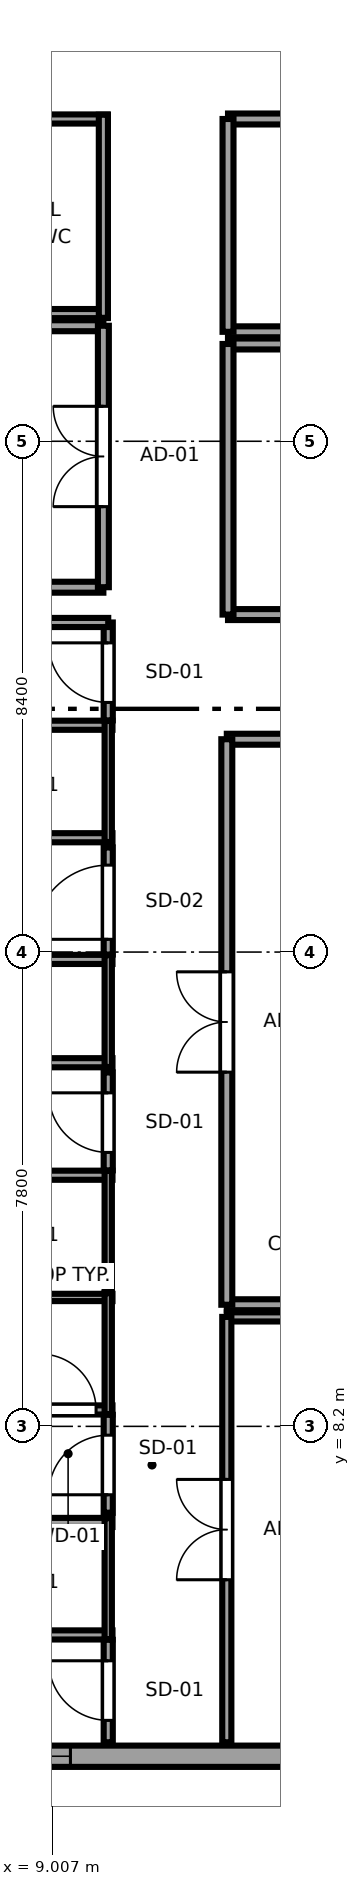
"""IFC4 building model, lengths in metres.
Left out: names, types, materials, properties, quantities, classifications, styles, units other than length and angle.
Written with IfcOpenShell. Run it as: python <this file> out.ifc"""

import sys

from ifc_helpers import new_model, si_unit, direction, frame, frame_2d, origin, place, context, subcontext, project, spatial, rectangle, extrude, source, transform, mapped, element, fill, save


model = new_model("IFC4")
c1 = context("Model", 3, precision=1e-05, world=origin(), true_north=direction((0.0, 1.0)))
c2 = subcontext(c1, "Body", "Model", "MODEL_VIEW")
j1 = project(units=[si_unit("LENGTHUNIT", "METRE"), si_unit("PLANEANGLEUNIT", "RADIAN")], contexts=[c1])
p1 = place(None, origin())
s1 = spatial("IfcSite", under=j1, at=p1, CompositionType="ELEMENT")
p2 = place(p1, origin())
s2 = spatial("IfcBuilding", under=s1, at=p2, CompositionType="ELEMENT")
p3 = place(p2, frame((0.0, 0.0, 262.95)))
s3 = spatial("IfcBuildingStorey", under=s2, at=p3, CompositionType="ELEMENT", Elevation=262.95)
p4 = place(p3, frame((7.017, 2.775, 0.0), z_axis=(0.0, 0.0, 1.0), x_axis=(1.0, 0.0, 0.0)))
e1 = element("IfcWall", 1, at=p4, inside=s3, PredefinedType="SOLIDWALL", context=c2, shape_type="SweptSolid", body=[
    extrude(rectangle(XDim=8.008, YDim=0.35, at=frame_2d((4.004, 0.0))), origin(), (0.0, 0.0, 1.0), 3.37),
])
p5 = place(p4, frame((0.791, 0.0, 0.62)))
e2 = element("IfcOpeningElement", 2, at=p5, cuts=e1, PredefinedType="OPENING", context=c2, shape_type="SweptSolid", body=[
    extrude(rectangle(XDim=1.5, YDim=1.55, at=frame_2d((0.75, 0.775))), frame((0.0, 0.185, 0.0), z_axis=(0.0, -1.0, 0.0), x_axis=(1.0, 0.0, 0.0)), (0.0, 0.0, 1.0), 0.37),
])
p6 = place(p3, frame((7.41, 4.77, 0.0), z_axis=(0.0, 0.0, 1.0), x_axis=(1.0, 0.0, 0.0)))
e3 = element("IfcWall", 3, at=p6, inside=s3, PredefinedType="PARTITIONING", context=c2, shape_type="SweptSolid", body=[
    extrude(rectangle(XDim=2.59, YDim=0.15, at=frame_2d((1.295, 0.0))), origin(), (0.0, 0.0, 1.0), 2.9),
])
p7 = place(p3, frame((7.41, 6.62, 0.0), z_axis=(0.0, 0.0, 1.0), x_axis=(1.0, 0.0, 0.0)))
e4 = element("IfcWall", 4, at=p7, inside=s3, PredefinedType="PARTITIONING", context=c2, shape_type="SweptSolid", body=[
    extrude(rectangle(XDim=2.59, YDim=0.15, at=frame_2d((1.295, 0.0))), origin(), (0.0, 0.0, 1.0), 3.37),
])
p8 = place(p3, frame((9.93, 4.7, 0.0), z_axis=(0.0, 0.0, 1.0), x_axis=(0.0, 1.0, 0.0)))
e5 = element("IfcWall", 5, at=p8, inside=s3, PredefinedType="PLUMBINGWALL", context=c2, shape_type="SweptSolid", body=[
    extrude(rectangle(XDim=1.99, YDim=0.12, at=frame_2d((0.995, 0.0))), origin(), (0.0, 0.0, 1.0), 3.37),
])
p9 = place(p3, frame((7.41, 8.47, 0.0), z_axis=(0.0, 0.0, 1.0), x_axis=(1.0, 0.0, 0.0)))
e6 = element("IfcWall", 6, at=p9, inside=s3, PredefinedType="PARTITIONING", context=c2, shape_type="SweptSolid", body=[
    extrude(rectangle(XDim=2.59, YDim=0.15, at=frame_2d((1.295, 0.0))), origin(), (0.0, 0.0, 1.0), 3.37),
])
p10 = place(p9, frame((1.4, 0.0, 0.0)))
e7 = element("IfcOpeningElement", 7, at=p10, cuts=e6, PredefinedType="OPENING", context=c2, shape_type="SweptSolid", body=[
    extrude(rectangle(XDim=0.92, YDim=2.01, at=frame_2d((0.46, 1.005))), frame((0.0, 0.085, 0.0), z_axis=(0.0, -1.0, 0.0), x_axis=(1.0, 0.0, 0.0)), (0.0, 0.0, 1.0), 0.17),
])
p11 = place(p3, frame((7.41, 10.32, 0.0), z_axis=(0.0, 0.0, 1.0), x_axis=(1.0, 0.0, 0.0)))
e8 = element("IfcWall", 8, at=p11, inside=s3, PredefinedType="PLUMBINGWALL", context=c2, shape_type="SweptSolid", body=[
    extrude(rectangle(XDim=2.59, YDim=0.12, at=frame_2d((1.295, 0.0))), origin(), (0.0, 0.0, 1.0), 3.37),
])
p12 = place(p3, frame((9.93, 8.4, 0.0), z_axis=(0.0, 0.0, 1.0), x_axis=(0.0, 1.0, 0.0)))
e9 = element("IfcWall", 9, at=p12, inside=s3, PredefinedType="PLUMBINGWALL", context=c2, shape_type="SweptSolid", body=[
    extrude(rectangle(XDim=1.99, YDim=0.12, at=frame_2d((0.995, 0.0))), origin(), (0.0, 0.0, 1.0), 3.37),
])
p13 = place(p3, frame((7.41, 12.33, 0.0), z_axis=(0.0, 0.0, 1.0), x_axis=(1.0, 0.0, 0.0)))
e10 = element("IfcWall", 10, at=p13, inside=s3, PredefinedType="PARTITIONING", context=c2, shape_type="SweptSolid", body=[
    extrude(rectangle(XDim=2.59, YDim=0.15, at=frame_2d((1.295, 0.0))), origin(), (0.0, 0.0, 1.0), 3.37),
])
p14 = place(p3, frame((9.93, 10.41, 0.0), z_axis=(0.0, 0.0, 1.0), x_axis=(0.0, 1.0, 0.0)))
e11 = element("IfcWall", 11, at=p14, inside=s3, PredefinedType="PLUMBINGWALL", context=c2, shape_type="SweptSolid", body=[
    extrude(rectangle(XDim=1.99, YDim=0.12, at=frame_2d((0.995, 0.0))), origin(), (0.0, 0.0, 1.0), 3.37),
])
p15 = place(p3, frame((3.005, 14.18, 0.0), z_axis=(0.0, 0.0, 1.0), x_axis=(1.0, 0.0, 0.0)))
e12 = element("IfcWall", 12, at=p15, inside=s3, PredefinedType="PARTITIONING", context=c2, shape_type="SweptSolid", body=[
    extrude(rectangle(XDim=6.995, YDim=0.15, at=frame_2d((3.498, 0.0))), origin(), (0.0, 0.0, 1.0), 3.37),
])
p16 = place(p3, frame((6.486, 15.879, 0.0), z_axis=(0.0, 0.0, 1.0), x_axis=(1.0, 0.0, 0.0)))
e13 = element("IfcWall", 13, at=p16, inside=s3, PredefinedType="PARTITIONING", context=c2, shape_type="SweptSolid", body=[
    extrude(rectangle(XDim=3.514, YDim=0.15, at=frame_2d((1.757, 0.0))), origin(), (0.0, 0.0, 1.0), 2.827),
])
p17 = place(p3, frame((9.93, 14.11, 0.0), z_axis=(0.0, 0.0, 1.0), x_axis=(0.0, 1.0, 0.0)))
e14 = element("IfcWall", 14, at=p17, inside=s3, PredefinedType="PLUMBINGWALL", context=c2, shape_type="SweptSolid", body=[
    extrude(rectangle(XDim=1.839, YDim=0.12, at=frame_2d((0.919, 0.0))), origin(), (0.0, 0.0, 1.0), 3.37),
])
p18 = place(p3, frame((3.005, 17.88, 0.0), z_axis=(0.0, 0.0, 1.0), x_axis=(1.0, 0.0, 0.0)))
e15 = element("IfcWall", 15, at=p18, inside=s3, PredefinedType="PARTITIONING", context=c2, shape_type="SweptSolid", body=[
    extrude(rectangle(XDim=6.995, YDim=0.15, at=frame_2d((3.498, 0.0))), origin(), (0.0, 0.0, 1.0), 3.37),
])
p19 = place(p3, frame((7.41, 19.73, 0.0), z_axis=(0.0, 0.0, 1.0), x_axis=(1.0, 0.0, 0.0)))
e16 = element("IfcWall", 16, at=p19, inside=s3, PredefinedType="PARTITIONING", context=c2, shape_type="SweptSolid", body=[
    extrude(rectangle(XDim=2.59, YDim=0.15, at=frame_2d((1.295, 0.0))), origin(), (0.0, 0.0, 1.0), 3.37),
])
p20 = place(p3, frame((9.93, 17.81, 0.0), z_axis=(0.0, 0.0, 1.0), x_axis=(0.0, 1.0, 0.0)))
e17 = element("IfcWall", 17, at=p20, inside=s3, PredefinedType="PLUMBINGWALL", context=c2, shape_type="SweptSolid", body=[
    extrude(rectangle(XDim=1.99, YDim=0.12, at=frame_2d((0.995, 0.0))), origin(), (0.0, 0.0, 1.0), 3.37),
])
p21 = place(p3, frame((9.93, 3.005, 0.0), z_axis=(0.0, 0.0, 1.0), x_axis=(0.0, 1.0, 0.0)))
e18 = element("IfcWall", 18, at=p21, inside=s3, PredefinedType="PARTITIONING", context=c2, shape_type="SweptSolid", body=[
    extrude(rectangle(XDim=1.685, YDim=0.15, at=frame_2d((0.843, 0.0))), origin(), (0.0, 0.0, 1.0), 3.37),
])
p22 = place(p21, frame((0.36, 0.0, 0.0)))
e19 = element("IfcOpeningElement", 19, at=p22, cuts=e18, PredefinedType="OPENING", context=c2, shape_type="SweptSolid", body=[
    extrude(rectangle(XDim=0.98, YDim=2.12, at=frame_2d((0.49, 1.06))), frame((0.0, 0.085, 0.0), z_axis=(0.0, -1.0, 0.0), x_axis=(1.0, 0.0, 0.0)), (0.0, 0.0, 1.0), 0.17),
])
p23 = place(p3, frame((9.93, 6.78, 0.0), z_axis=(0.0, 0.0, 1.0), x_axis=(0.0, 1.0, 0.0)))
e20 = element("IfcWall", 20, at=p23, inside=s3, PredefinedType="PARTITIONING", context=c2, shape_type="SweptSolid", body=[
    extrude(rectangle(XDim=1.61, YDim=0.15, at=frame_2d((0.805, 0.0))), origin(), (0.0, 0.0, 1.0), 3.37),
])
p24 = place(p23, frame((0.295, 0.0, 0.0)))
e21 = element("IfcOpeningElement", 21, at=p24, cuts=e20, PredefinedType="OPENING", context=c2, shape_type="SweptSolid", body=[
    extrude(rectangle(XDim=0.98, YDim=2.12, at=frame_2d((0.49, 1.06))), frame((0.0, 0.085, 0.0), z_axis=(0.0, -1.0, 0.0), x_axis=(1.0, 0.0, 0.0)), (0.0, 0.0, 1.0), 0.17),
])
p25 = place(p3, frame((9.93, 12.41, 0.0), z_axis=(0.0, 0.0, 1.0), x_axis=(0.0, 1.0, 0.0)))
e22 = element("IfcWall", 22, at=p25, inside=s3, PredefinedType="PARTITIONING", context=c2, shape_type="SweptSolid", body=[
    extrude(rectangle(XDim=1.61, YDim=0.15, at=frame_2d((0.805, 0.0))), origin(), (0.0, 0.0, 1.0), 3.37),
])
p26 = place(p25, frame((0.295, 0.0, 0.0)))
e23 = element("IfcOpeningElement", 23, at=p26, cuts=e22, PredefinedType="OPENING", context=c2, shape_type="SweptSolid", body=[
    extrude(rectangle(XDim=0.98, YDim=2.12, at=frame_2d((0.49, 1.06))), frame((0.0, 0.085, 0.0), z_axis=(0.0, -1.0, 0.0), x_axis=(1.0, 0.0, 0.0)), (0.0, 0.0, 1.0), 0.17),
])
p27 = place(p3, frame((9.93, 15.959, 0.0), z_axis=(0.0, 0.0, 1.0), x_axis=(0.0, 1.0, 0.0)))
e24 = element("IfcWall", 24, at=p27, inside=s3, PredefinedType="PARTITIONING", context=c2, shape_type="SweptSolid", body=[
    extrude(rectangle(XDim=1.761, YDim=0.15, at=frame_2d((0.88, 0.0))), origin(), (0.0, 0.0, 1.0), 3.37),
])
p28 = place(p27, frame((0.25, 0.0, 0.0)))
e25 = element("IfcOpeningElement", 25, at=p28, cuts=e24, PredefinedType="OPENING", context=c2, shape_type="SweptSolid", body=[
    extrude(rectangle(XDim=1.22, YDim=2.08, at=frame_2d((0.61, 1.04))), frame((0.0, 0.085, 0.0), z_axis=(0.0, -1.0, 0.0), x_axis=(1.0, 0.0, 0.0)), (0.0, 0.0, 1.0), 0.17),
])
p29 = place(p3, frame((9.93, 19.81, 0.0), z_axis=(0.0, 0.0, 1.0), x_axis=(0.0, 1.0, 0.0)))
e26 = element("IfcWall", 26, at=p29, inside=s3, PredefinedType="PARTITIONING", context=c2, shape_type="SweptSolid", body=[
    extrude(rectangle(XDim=1.61, YDim=0.15, at=frame_2d((0.805, 0.0))), origin(), (0.0, 0.0, 1.0), 3.37),
])
p30 = place(p29, frame((0.295, 0.0, 0.0)))
e27 = element("IfcOpeningElement", 27, at=p30, cuts=e26, PredefinedType="OPENING", context=c2, shape_type="SweptSolid", body=[
    extrude(rectangle(XDim=0.98, YDim=2.12, at=frame_2d((0.49, 1.06))), frame((0.0, 0.085, 0.0), z_axis=(0.0, -1.0, 0.0), x_axis=(1.0, 0.0, 0.0)), (0.0, 0.0, 1.0), 0.17),
])
p31 = place(p3, frame((3.005, 21.42, 0.0), z_axis=(0.0, 0.0, 1.0), x_axis=(1.0, 0.0, 0.0)))
e28 = element("IfcWall", 28, at=p31, inside=s3, PredefinedType="PARTITIONING", context=c2, shape_type="SweptSolid", body=[
    extrude(rectangle(XDim=6.925, YDim=0.15, at=frame_2d((3.462, 0.0))), origin(), (0.0, 0.0, 1.0), 3.37),
])
for number, where, z_axis, x_axis in (
    (29, (11.88, 10.2, 0.0), (0.0, 0.0, 1.0), (1.0, 0.0, 0.0)),
    (30, (11.88, 19.5, 0.0), (0.0, 0.0, 1.0), (1.0, 0.0, 0.0)),
):
    element("IfcWall", number, at=place(p3, frame(where, z_axis=z_axis, x_axis=x_axis)), inside=s3, PredefinedType="PARTITIONING", context=c2, shape_type="SweptSolid", body=[
        extrude(rectangle(XDim=2.97, YDim=0.18, at=frame_2d((1.485, 0.0))), origin(), (0.0, 0.0, 1.0), 3.37),
    ])
p32 = place(p3, frame((11.88, 10.2, 0.0), z_axis=(0.0, 0.0, 1.0), x_axis=(0.0, 1.0, 0.0)))
e31 = element("IfcWall", 31, at=p32, inside=s3, PredefinedType="PARTITIONING", context=c2, shape_type="SweptSolid", body=[
    extrude(rectangle(XDim=9.3, YDim=0.18, at=frame_2d((4.65, 0.0))), origin(), (0.0, 0.0, 1.0), 3.37),
])
p33 = place(p32, frame((3.825, 0.0, 0.0)))
e32 = element("IfcOpeningElement", 32, at=p33, cuts=e31, PredefinedType="OPENING", context=c2, shape_type="SweptSolid", body=[
    extrude(rectangle(XDim=1.65, YDim=2.15, at=frame_2d((0.825, 1.075))), frame((0.0, 0.1, 0.0), z_axis=(0.0, -1.0, 0.0), x_axis=(1.0, 0.0, 0.0)), (0.0, 0.0, 1.0), 0.2),
])
p34 = place(p3, frame((11.88, 10.0, 0.0), z_axis=(0.0, 0.0, 1.0), x_axis=(1.0, 0.0, 0.0)))
e33 = element("IfcWall", 33, at=p34, inside=s3, PredefinedType="PARTITIONING", context=c2, shape_type="SweptSolid", body=[
    extrude(rectangle(XDim=2.97, YDim=0.15, at=frame_2d((1.485, 0.0))), origin(), (0.0, 0.0, 1.0), 3.37),
])
p35 = place(p3, frame((11.88, 3.005, 0.0), z_axis=(0.0, 0.0, 1.0), x_axis=(0.0, 1.0, 0.0)))
e34 = element("IfcWall", 34, at=p35, inside=s3, PredefinedType="PARTITIONING", context=c2, shape_type="SweptSolid", body=[
    extrude(rectangle(XDim=6.995, YDim=0.15, at=frame_2d((3.498, 0.0))), origin(), (0.0, 0.0, 1.0), 3.37),
])
p36 = place(p35, frame((2.673, 0.0, 0.0)))
e35 = element("IfcOpeningElement", 35, at=p36, cuts=e34, PredefinedType="OPENING", context=c2, shape_type="SweptSolid", body=[
    extrude(rectangle(XDim=1.65, YDim=2.15, at=frame_2d((0.825, 1.075))), frame((0.0, 0.085, 0.0), z_axis=(0.0, -1.0, 0.0), x_axis=(1.0, 0.0, 0.0)), (0.0, 0.0, 1.0), 0.17),
])
p37 = place(p3, frame((11.9, 21.55, 0.0), z_axis=(0.0, 0.0, 1.0), x_axis=(1.0, 0.0, 0.0)))
e36 = element("IfcWall", 36, at=p37, inside=s3, PredefinedType="PARTITIONING", context=c2, shape_type="SweptSolid", body=[
    extrude(rectangle(XDim=20.9, YDim=0.18, at=frame_2d((10.45, 0.0))), origin(), (0.0, 0.0, 1.0), 3.37),
])
p38 = place(p37, frame((10.575, 0.0, 0.0)))
e37 = element("IfcOpeningElement", 37, at=p38, cuts=e36, PredefinedType="OPENING", context=c2, shape_type="SweptSolid", body=[
    extrude(rectangle(XDim=1.65, YDim=2.15, at=frame_2d((0.825, 1.075))), frame((0.0, 0.1, 0.0), z_axis=(0.0, -1.0, 0.0), x_axis=(1.0, 0.0, 0.0)), (0.0, 0.0, 1.0), 0.2),
])
p39 = place(p3, frame((11.9, 26.0, 0.0), z_axis=(0.0, 0.0, 1.0), x_axis=(1.0, 0.0, 0.0)))
e38 = element("IfcWall", 38, at=p39, inside=s3, PredefinedType="PARTITIONING", context=c2, shape_type="SweptSolid", body=[
    extrude(rectangle(XDim=20.9, YDim=0.18, at=frame_2d((10.45, 0.0))), origin(), (0.0, 0.0, 1.0), 3.37),
])
p40 = place(p3, frame((11.9, 21.55, 0.0), z_axis=(0.0, 0.0, 1.0), x_axis=(0.0, 1.0, 0.0)))
e39 = element("IfcWall", 39, at=p40, inside=s3, PredefinedType="PARTITIONING", context=c2, shape_type="SweptSolid", body=[
    extrude(rectangle(XDim=4.45, YDim=0.18, at=frame_2d((2.225, 0.0))), origin(), (0.0, 0.0, 1.0), 3.37),
])
p41 = place(p3, frame((11.9, 26.2, 0.0), z_axis=(0.0, 0.0, 1.0), x_axis=(1.0, 0.0, 0.0)))
e40 = element("IfcWall", 40, at=p41, inside=s3, PredefinedType="PARTITIONING", context=c2, shape_type="SweptSolid", body=[
    extrude(rectangle(XDim=20.9, YDim=0.18, at=frame_2d((10.45, 0.0))), origin(), (0.0, 0.0, 1.0), 3.37),
])
p42 = place(p3, frame((11.9, 29.7, 0.0), z_axis=(0.0, 0.0, 1.0), x_axis=(1.0, 0.0, 0.0)))
e41 = element("IfcWall", 41, at=p42, inside=s3, PredefinedType="PARTITIONING", context=c2, shape_type="SweptSolid", body=[
    extrude(rectangle(XDim=20.9, YDim=0.18, at=frame_2d((10.45, 0.0))), origin(), (0.0, 0.0, 1.0), 3.37),
])
p43 = place(p42, frame((9.625, 0.0, 0.0)))
e42 = element("IfcOpeningElement", 42, at=p43, cuts=e41, PredefinedType="OPENING", context=c2, shape_type="SweptSolid", body=[
    extrude(rectangle(XDim=1.65, YDim=2.15, at=frame_2d((0.825, 1.075))), frame((0.0, 0.1, 0.0), z_axis=(0.0, -1.0, 0.0), x_axis=(1.0, 0.0, 0.0)), (0.0, 0.0, 1.0), 0.2),
])
p44 = place(p3, frame((11.9, 26.2, 0.0), z_axis=(0.0, 0.0, 1.0), x_axis=(0.0, 1.0, 0.0)))
e43 = element("IfcWall", 43, at=p44, inside=s3, PredefinedType="PARTITIONING", context=c2, shape_type="SweptSolid", body=[
    extrude(rectangle(XDim=3.5, YDim=0.18, at=frame_2d((1.75, 0.0))), origin(), (0.0, 0.0, 1.0), 3.37),
])
for number, where, z_axis, x_axis in (
    (44, (3.005, 22.0, 0.0), (0.0, 0.0, 1.0), (1.0, 0.0, 0.0)),
    (45, (3.005, 26.3, 0.0), (0.0, 0.0, 1.0), (1.0, 0.0, 0.0)),
):
    element("IfcWall", number, at=place(p3, frame(where, z_axis=z_axis, x_axis=x_axis)), inside=s3, PredefinedType="PARTITIONING", context=c2, shape_type="SweptSolid", body=[
        extrude(rectangle(XDim=6.845, YDim=0.18, at=frame_2d((3.423, 0.0))), origin(), (0.0, 0.0, 1.0), 3.37),
    ])
p45 = place(p3, frame((9.85, 22.0, 0.0), z_axis=(0.0, 0.0, 1.0), x_axis=(0.0, 1.0, 0.0)))
e46 = element("IfcWall", 46, at=p45, inside=s3, PredefinedType="PARTITIONING", context=c2, shape_type="SweptSolid", body=[
    extrude(rectangle(XDim=4.3, YDim=0.18, at=frame_2d((2.15, 0.0))), origin(), (0.0, 0.0, 1.0), 3.37),
])
p46 = place(p45, frame((1.325, 0.0, 0.0)))
e47 = element("IfcOpeningElement", 47, at=p46, cuts=e46, PredefinedType="OPENING", context=c2, shape_type="SweptSolid", body=[
    extrude(rectangle(XDim=1.65, YDim=2.15, at=frame_2d((0.825, 1.075))), frame((0.0, 0.1, 0.0), z_axis=(0.0, -1.0, 0.0), x_axis=(1.0, 0.0, 0.0)), (0.0, 0.0, 1.0), 0.2),
])
p47 = place(p3, frame((6.13, 26.5, 0.0), z_axis=(0.0, 0.0, 1.0), x_axis=(1.0, 0.0, 0.0)))
e48 = element("IfcWall", 48, at=p47, inside=s3, PredefinedType="PARTITIONING", context=c2, shape_type="SweptSolid", body=[
    extrude(rectangle(XDim=3.79, YDim=0.15, at=frame_2d((1.895, 0.0))), origin(), (0.0, 0.0, 1.0), 3.37),
])
p48 = place(p3, frame((6.13, 29.7, 0.0), z_axis=(0.0, 0.0, 1.0), x_axis=(1.0, 0.0, 0.0)))
e49 = element("IfcWall", 49, at=p48, inside=s3, PredefinedType="PARTITIONING", context=c2, shape_type="SweptSolid", body=[
    extrude(rectangle(XDim=3.79, YDim=0.15, at=frame_2d((1.895, 0.0))), origin(), (0.0, 0.0, 1.0), 3.37),
])
p49 = place(p48, frame((1.435, 0.0, 0.0)))
e50 = element("IfcOpeningElement", 50, at=p49, cuts=e49, PredefinedType="OPENING", context=c2, shape_type="SweptSolid", body=[
    extrude(rectangle(XDim=0.92, YDim=2.01, at=frame_2d((0.46, 1.005))), frame((0.0, 0.085, 0.0), z_axis=(0.0, -1.0, 0.0), x_axis=(1.0, 0.0, 0.0)), (0.0, 0.0, 1.0), 0.17),
])
p50 = place(p3, frame((9.85, 26.43, 0.0), z_axis=(0.0, 0.0, 1.0), x_axis=(0.0, 1.0, 0.0)))
e51 = element("IfcWall", 51, at=p50, inside=s3, PredefinedType="PARTITIONING", context=c2, shape_type="SweptSolid", body=[
    extrude(rectangle(XDim=3.34, YDim=0.15, at=frame_2d((1.67, 0.0))), origin(), (0.0, 0.0, 1.0), 3.37),
])
m1 = source(origin(), c2, "Body", "SweptSolid", [
    extrude(rectangle(XDim=1.5, YDim=1.55, at=frame_2d((0.75, 0.775))), frame((0.0, 0.09, 0.0), z_axis=(0.0, -1.0, 0.0), x_axis=(1.0, 0.0, 0.0)), (0.0, 0.0, 1.0), 0.06),
])
p51 = place(p5, origin())
e52 = element("IfcWindow", 52, at=p51, inside=s3, PartitioningType="SINGLE_PANEL", PredefinedType="WINDOW", context=c2, shape_type="MappedRepresentation", body=[
    mapped(m1, transform((0.0, 0.0, 0.0), x_axis=(1.0, 0.0, 0.0), y_axis=(0.0, 1.0, 0.0), z_axis=(0.0, 0.0, 1.0), scale=1.0)),
])
fill(e2, e52)
m2 = source(origin(), c2, "Body", "SweptSolid", [
    extrude(rectangle(XDim=0.92, YDim=2.01, at=frame_2d((0.46, 1.005))), frame((0.0, 0.025, 0.0), z_axis=(0.0, -1.0, 0.0), x_axis=(1.0, 0.0, 0.0)), (0.0, 0.0, 1.0), 0.05),
])
p52 = place(p10, origin())
e53 = element("IfcDoor", 53, at=p52, inside=s3, OperationType="SINGLE_SWING_LEFT", PredefinedType="DOOR", context=c2, shape_type="MappedRepresentation", body=[
    mapped(m2, transform((0.0, 0.0, 0.0), x_axis=(1.0, 0.0, 0.0), y_axis=(0.0, 1.0, 0.0), z_axis=(0.0, 0.0, 1.0), scale=1.0)),
])
fill(e7, e53)
m3 = source(origin(), c2, "Body", "SweptSolid", [
    extrude(rectangle(XDim=0.98, YDim=2.12, at=frame_2d((0.49, 1.06))), frame((0.0, 0.025, 0.0), z_axis=(0.0, -1.0, 0.0), x_axis=(1.0, 0.0, 0.0)), (0.0, 0.0, 1.0), 0.05),
])
p53 = place(p22, origin())
e54 = element("IfcDoor", 54, at=p53, inside=s3, OperationType="SINGLE_SWING_RIGHT", PredefinedType="DOOR", context=c2, shape_type="MappedRepresentation", body=[
    mapped(m3, transform((0.0, 0.0, 0.0), x_axis=(1.0, 0.0, 0.0), y_axis=(0.0, 1.0, 0.0), z_axis=(0.0, 0.0, 1.0), scale=1.0)),
])
fill(e19, e54)
p54 = place(p24, origin())
e55 = element("IfcDoor", 55, at=p54, inside=s3, OperationType="SINGLE_SWING_LEFT", PredefinedType="DOOR", context=c2, shape_type="MappedRepresentation", body=[
    mapped(m3, transform((0.0, 0.0, 0.0), x_axis=(1.0, 0.0, 0.0), y_axis=(0.0, 1.0, 0.0), z_axis=(0.0, 0.0, 1.0), scale=1.0)),
])
fill(e21, e55)
p55 = place(p26, origin())
e56 = element("IfcDoor", 56, at=p55, inside=s3, OperationType="SINGLE_SWING_RIGHT", PredefinedType="DOOR", context=c2, shape_type="MappedRepresentation", body=[
    mapped(m3, transform((0.0, 0.0, 0.0), x_axis=(1.0, 0.0, 0.0), y_axis=(0.0, 1.0, 0.0), z_axis=(0.0, 0.0, 1.0), scale=1.0)),
])
fill(e23, e56)
m4 = source(origin(), c2, "Body", "SweptSolid", [
    extrude(rectangle(XDim=1.22, YDim=2.08, at=frame_2d((0.61, 1.04))), frame((0.0, 0.025, 0.0), z_axis=(0.0, -1.0, 0.0), x_axis=(1.0, 0.0, 0.0)), (0.0, 0.0, 1.0), 0.05),
])
p56 = place(p28, origin())
e57 = element("IfcDoor", 57, at=p56, inside=s3, OperationType="SINGLE_SWING_LEFT", PredefinedType="DOOR", context=c2, shape_type="MappedRepresentation", body=[
    mapped(m4, transform((0.0, 0.0, 0.0), x_axis=(1.0, 0.0, 0.0), y_axis=(0.0, 1.0, 0.0), z_axis=(0.0, 0.0, 1.0), scale=1.0)),
])
fill(e25, e57)
p57 = place(p30, origin())
e58 = element("IfcDoor", 58, at=p57, inside=s3, OperationType="SINGLE_SWING_RIGHT", PredefinedType="DOOR", context=c2, shape_type="MappedRepresentation", body=[
    mapped(m3, transform((0.0, 0.0, 0.0), x_axis=(1.0, 0.0, 0.0), y_axis=(0.0, 1.0, 0.0), z_axis=(0.0, 0.0, 1.0), scale=1.0)),
])
fill(e27, e58)
m5 = source(origin(), c2, "Body", "SweptSolid", [
    extrude(rectangle(XDim=1.65, YDim=2.15, at=frame_2d((0.825, 1.075))), frame((0.0, 0.025, 0.0), z_axis=(0.0, -1.0, 0.0), x_axis=(1.0, 0.0, 0.0)), (0.0, 0.0, 1.0), 0.05),
])
p58 = place(p33, origin())
e59 = element("IfcDoor", 59, at=p58, inside=s3, OperationType="DOUBLE_DOOR_SINGLE_SWING", PredefinedType="DOOR", context=c2, shape_type="MappedRepresentation", body=[
    mapped(m5, transform((0.0, 0.0, 0.0), x_axis=(1.0, 0.0, 0.0), y_axis=(0.0, 1.0, 0.0), z_axis=(0.0, 0.0, 1.0), scale=1.0)),
])
fill(e32, e59)
p59 = place(p36, origin())
e60 = element("IfcDoor", 60, at=p59, inside=s3, OperationType="DOUBLE_DOOR_SINGLE_SWING", PredefinedType="DOOR", context=c2, shape_type="MappedRepresentation", body=[
    mapped(m5, transform((0.0, 0.0, 0.0), x_axis=(1.0, 0.0, 0.0), y_axis=(0.0, 1.0, 0.0), z_axis=(0.0, 0.0, 1.0), scale=1.0)),
])
fill(e35, e60)
p60 = place(p46, origin())
e61 = element("IfcDoor", 61, at=p60, inside=s3, OperationType="DOUBLE_DOOR_SINGLE_SWING", PredefinedType="DOOR", context=c2, shape_type="MappedRepresentation", body=[
    mapped(m5, transform((0.0, 0.0, 0.0), x_axis=(1.0, 0.0, 0.0), y_axis=(0.0, 1.0, 0.0), z_axis=(0.0, 0.0, 1.0), scale=1.0)),
])
fill(e47, e61)
save(model, sys.argv[1])
